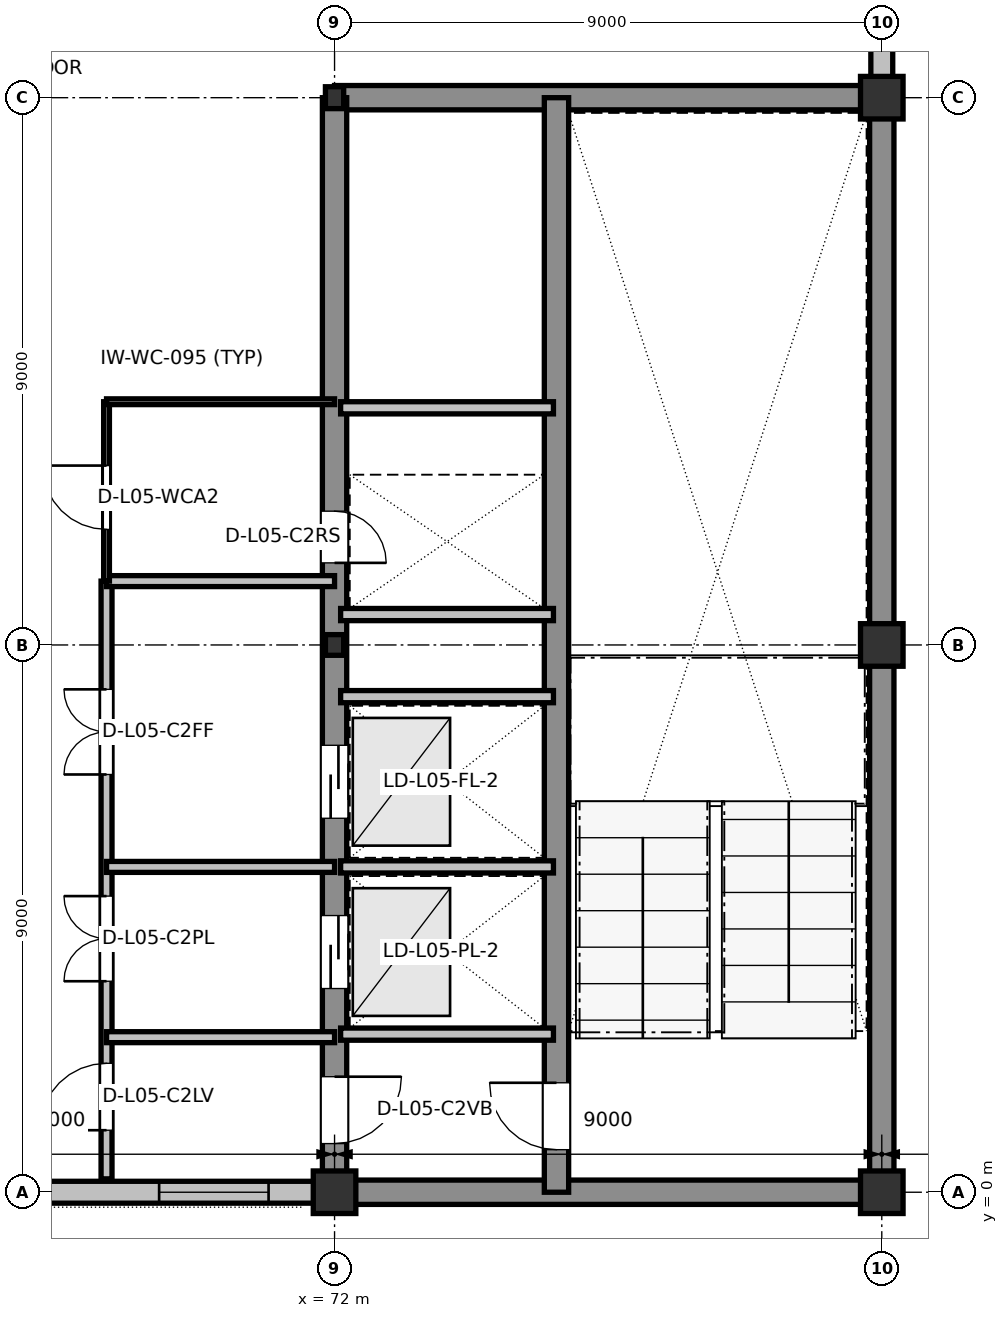
"""IFC4 building model, lengths in metres.
Left out: names, types, materials, properties, quantities, classifications, styles, units other than length and angle.
Written with IfcOpenShell. Run it as: python <this file> out.ifc"""

import sys

from ifc_helpers import new_model, si_unit, direction, frame, frame_2d, origin, origin_2d, place, context, subcontext, project, spatial, rectangle, i_section, extrude, element, fill, save


model = new_model("IFC4")
c1 = context("Model", 3, precision=1e-05, world=origin(), true_north=direction((0.0, 1.0)))
c2 = subcontext(c1, "Body", "Model", "MODEL_VIEW")
j1 = project(units=[si_unit("LENGTHUNIT", "METRE"), si_unit("PLANEANGLEUNIT", "RADIAN")], contexts=[c1])
p1 = place(None, origin())
s1 = spatial("IfcSite", under=j1, at=p1, CompositionType="ELEMENT")
p2 = place(p1, origin())
s2 = spatial("IfcBuilding", under=s1, at=p2, CompositionType="ELEMENT")
p3 = place(p2, frame((0.0, 0.0, 23.4)))
s3 = spatial("IfcBuildingStorey", under=s2, at=p3, CompositionType="ELEMENT", Elevation=23.4)
p4 = place(p3, frame((72.0, 0.0, 0.0), z_axis=(0.0, 0.0, 1.0), x_axis=(1.0, 0.0, 0.0)))
e1 = element("IfcColumn", 1, at=p4, inside=s3, PredefinedType="COLUMN", context=c2, shape_type="SweptSolid", body=[
    extrude(rectangle(XDim=0.7, YDim=0.7, at=origin_2d()), origin(), (0.0, 0.0, 1.0), 4.2),
])
p5 = place(p3, frame((72.0, 9.0, 0.0), z_axis=(0.0, 0.0, 1.0), x_axis=(1.0, 0.0, 0.0)))
e2 = element("IfcColumn", 2, at=p5, inside=s3, PredefinedType="COLUMN", context=c2, shape_type="SweptSolid", body=[
    extrude(i_section(OverallWidth=0.3, OverallDepth=0.34, WebThickness=0.012, FlangeThickness=0.021, at=origin_2d()), origin(), (0.0, 0.0, 1.0), 4.2),
])
p6 = place(p3, frame((72.0, 18.0, 0.0), z_axis=(0.0, 0.0, 1.0), x_axis=(1.0, 0.0, 0.0)))
e3 = element("IfcColumn", 3, at=p6, inside=s3, PredefinedType="COLUMN", context=c2, shape_type="SweptSolid", body=[
    extrude(i_section(OverallWidth=0.3, OverallDepth=0.36, WebThickness=0.012, FlangeThickness=0.022, at=origin_2d()), origin(), (0.0, 0.0, 1.0), 4.2),
])
for number, where, z_axis, x_axis in (
    (4, (81.0, 0.0, 0.0), (0.0, 0.0, 1.0), (1.0, 0.0, 0.0)),
    (5, (81.0, 9.0, 0.0), (0.0, 0.0, 1.0), (1.0, 0.0, 0.0)),
    (6, (81.0, 18.0, 0.0), (0.0, 0.0, 1.0), (1.0, 0.0, 0.0)),
):
    element("IfcColumn", number, at=place(p3, frame(where, z_axis=z_axis, x_axis=x_axis)), inside=s3, PredefinedType="COLUMN", context=c2, shape_type="SweptSolid", body=[
        extrude(rectangle(XDim=0.7, YDim=0.7, at=origin_2d()), origin(), (0.0, 0.0, 1.0), 4.2),
    ])
p7 = place(p3, frame((81.0, 18.335, 0.0), z_axis=(0.0, 0.0, 1.0), x_axis=(0.0, 1.0, 0.0)))
e7 = element("IfcWall", 7, at=p7, inside=s3, PredefinedType="STANDARD", context=c2, shape_type="SweptSolid", body=[
    extrude(rectangle(XDim=2.74, YDim=0.36, at=frame_2d((1.37, 0.0))), origin(), (0.0, 0.0, 1.0), 3.94),
])
p8 = place(p3, frame((63.335, 0.0, 0.0), z_axis=(0.0, 0.0, 1.0), x_axis=(1.0, 0.0, 0.0)))
e8 = element("IfcWall", 8, at=p8, inside=s3, PredefinedType="STANDARD", context=c2, shape_type="SweptSolid", body=[
    extrude(rectangle(XDim=8.33, YDim=0.36, at=frame_2d((4.165, 0.0))), origin(), (0.0, 0.0, 1.0), 3.715),
])
p9 = place(p8, frame((5.78, 0.0, 0.9)))
e9 = element("IfcOpeningElement", 9, at=p9, cuts=e8, PredefinedType="OPENING", context=c2, shape_type="SweptSolid", body=[
    extrude(rectangle(XDim=1.8, YDim=2.1, at=frame_2d((0.9, 1.05))), frame((0.0, 0.19, 0.0), z_axis=(0.0, -1.0, 0.0), x_axis=(1.0, 0.0, 0.0)), (0.0, 0.0, 1.0), 0.38),
])
p10 = place(p3, frame((72.0, 0.0, 0.0), z_axis=(0.0, 0.0, 1.0), x_axis=(1.0, 0.0, 0.0)))
e10 = element("IfcWall", 10, at=p10, inside=s3, PredefinedType="SHEAR", context=c2, shape_type="SweptSolid", body=[
    extrude(rectangle(XDim=9.0, YDim=0.4, at=frame_2d((4.5, 0.0))), origin(), (0.0, 0.0, 1.0), 3.96),
])
p11 = place(p3, frame((81.0, 0.0, 0.0), z_axis=(0.0, 0.0, 1.0), x_axis=(0.0, 1.0, 0.0)))
e11 = element("IfcWall", 11, at=p11, inside=s3, PredefinedType="SHEAR", context=c2, shape_type="SweptSolid", body=[
    extrude(rectangle(XDim=18.0, YDim=0.4, at=frame_2d((9.0, 0.0))), origin(), (0.0, 0.0, 1.0), 3.96),
])
p12 = place(p3, frame((81.0, 18.0, 0.0), z_axis=(0.0, 0.0, 1.0), x_axis=(-1.0, 0.0, 0.0)))
e12 = element("IfcWall", 12, at=p12, inside=s3, PredefinedType="SHEAR", context=c2, shape_type="SweptSolid", body=[
    extrude(rectangle(XDim=9.0, YDim=0.4, at=frame_2d((4.5, 0.0))), origin(), (0.0, 0.0, 1.0), 3.96),
])
p13 = place(p3, frame((72.0, 18.0, 0.0), z_axis=(0.0, 0.0, 1.0), x_axis=(0.0, -1.0, 0.0)))
e13 = element("IfcWall", 13, at=p13, inside=s3, PredefinedType="SHEAR", context=c2, shape_type="SweptSolid", body=[
    extrude(rectangle(XDim=18.0, YDim=0.4, at=frame_2d((9.0, 0.0))), origin(), (0.0, 0.0, 1.0), 3.96),
])
p14 = place(p13, frame((16.1, 0.0, 0.0)))
e14 = element("IfcOpeningElement", 14, at=p14, cuts=e13, PredefinedType="OPENING", context=c2, shape_type="SweptSolid", body=[
    extrude(rectangle(XDim=1.1, YDim=2.16, at=frame_2d((0.55, 1.08))), frame((0.0, 0.21, 0.0), z_axis=(0.0, -1.0, 0.0), x_axis=(1.0, 0.0, 0.0)), (0.0, 0.0, 1.0), 0.42),
])
p15 = place(p13, frame((13.45, 0.0, 0.0)))
e15 = element("IfcOpeningElement", 15, at=p15, cuts=e13, PredefinedType="OPENING", context=c2, shape_type="SweptSolid", body=[
    extrude(rectangle(XDim=1.2, YDim=2.2, at=frame_2d((0.6, 1.1))), frame((0.0, 0.21, 0.0), z_axis=(0.0, -1.0, 0.0), x_axis=(1.0, 0.0, 0.0)), (0.0, 0.0, 1.0), 0.42),
])
p16 = place(p13, frame((10.65, 0.0, 0.0)))
e16 = element("IfcOpeningElement", 16, at=p16, cuts=e13, PredefinedType="OPENING", context=c2, shape_type="SweptSolid", body=[
    extrude(rectangle(XDim=1.2, YDim=2.2, at=frame_2d((0.6, 1.1))), frame((0.0, 0.21, 0.0), z_axis=(0.0, -1.0, 0.0), x_axis=(1.0, 0.0, 0.0)), (0.0, 0.0, 1.0), 0.42),
])
p17 = place(p13, frame((6.8, 0.0, 0.0)))
e17 = element("IfcOpeningElement", 17, at=p17, cuts=e13, PredefinedType="OPENING", context=c2, shape_type="SweptSolid", body=[
    extrude(rectangle(XDim=0.85, YDim=2.1, at=frame_2d((0.425, 1.05))), frame((0.0, 0.21, 0.0), z_axis=(0.0, -1.0, 0.0), x_axis=(1.0, 0.0, 0.0)), (0.0, 0.0, 1.0), 0.42),
])
p18 = place(p3, frame((75.65, 0.0, 0.0), z_axis=(0.0, 0.0, 1.0), x_axis=(0.0, 1.0, 0.0)))
e18 = element("IfcWall", 18, at=p18, inside=s3, PredefinedType="SHEAR", context=c2, shape_type="SweptSolid", body=[
    extrude(rectangle(XDim=18.0, YDim=0.4, at=frame_2d((9.0, 0.0))), origin(), (0.0, 0.0, 1.0), 3.96),
])
p19 = place(p18, frame((0.7, 0.0, 0.0)))
e19 = element("IfcOpeningElement", 19, at=p19, cuts=e18, PredefinedType="OPENING", context=c2, shape_type="SweptSolid", body=[
    extrude(rectangle(XDim=1.1, YDim=2.16, at=frame_2d((0.55, 1.08))), frame((0.0, 0.21, 0.0), z_axis=(0.0, -1.0, 0.0), x_axis=(1.0, 0.0, 0.0)), (0.0, 0.0, 1.0), 0.42),
])
for number, where, z_axis, x_axis in (
    (20, (72.1, 2.6, 0.0), (0.0, 0.0, 1.0), (1.0, 0.0, 0.0)),
    (21, (72.1, 5.35, 0.0), (0.0, 0.0, 1.0), (1.0, 0.0, 0.0)),
    (22, (72.1, 8.15, 0.0), (0.0, 0.0, 1.0), (1.0, 0.0, 0.0)),
    (23, (72.1, 9.5, 0.0), (0.0, 0.0, 1.0), (1.0, 0.0, 0.0)),
    (24, (72.1, 12.9, 0.0), (0.0, 0.0, 1.0), (1.0, 0.0, 0.0)),
):
    element("IfcWall", number, at=place(p3, frame(where, z_axis=z_axis, x_axis=x_axis)), inside=s3, PredefinedType="PARTITIONING", context=c2, shape_type="SweptSolid", body=[
        extrude(rectangle(XDim=3.5, YDim=0.2, at=frame_2d((1.75, 0.0))), origin(), (0.0, 0.0, 1.0), 3.96),
    ])
p20 = place(p3, frame((68.25, 0.22, 0.0), z_axis=(0.0, 0.0, 1.0), x_axis=(0.0, 1.0, 0.0)))
e25 = element("IfcWall", 25, at=p20, inside=s3, PredefinedType="PARTITIONING", context=c2, shape_type="SweptSolid", body=[
    extrude(rectangle(XDim=9.83, YDim=0.18, at=frame_2d((4.915, 0.0))), origin(), (0.0, 0.0, 1.0), 3.96),
])
p21 = place(p20, frame((0.8, 0.0, 0.0)))
e26 = element("IfcOpeningElement", 26, at=p21, cuts=e25, PredefinedType="OPENING", context=c2, shape_type="SweptSolid", body=[
    extrude(rectangle(XDim=1.1, YDim=2.16, at=frame_2d((0.55, 1.08))), frame((0.0, 0.1, 0.0), z_axis=(0.0, -1.0, 0.0), x_axis=(1.0, 0.0, 0.0)), (0.0, 0.0, 1.0), 0.2),
])
p22 = place(p20, frame((3.25, 0.0, 0.0)))
e27 = element("IfcOpeningElement", 27, at=p22, cuts=e25, PredefinedType="OPENING", context=c2, shape_type="SweptSolid", body=[
    extrude(rectangle(XDim=1.4, YDim=2.2, at=frame_2d((0.7, 1.1))), frame((0.0, 0.1, 0.0), z_axis=(0.0, -1.0, 0.0), x_axis=(1.0, 0.0, 0.0)), (0.0, 0.0, 1.0), 0.2),
])
p23 = place(p20, frame((6.65, 0.0, 0.0)))
e28 = element("IfcOpeningElement", 28, at=p23, cuts=e25, PredefinedType="OPENING", context=c2, shape_type="SweptSolid", body=[
    extrude(rectangle(XDim=1.4, YDim=2.2, at=frame_2d((0.7, 1.1))), frame((0.0, 0.1, 0.0), z_axis=(0.0, -1.0, 0.0), x_axis=(1.0, 0.0, 0.0)), (0.0, 0.0, 1.0), 0.2),
])
for number, where, z_axis, x_axis in (
    (29, (68.25, 2.55, 0.0), (0.0, 0.0, 1.0), (1.0, 0.0, 0.0)),
    (30, (68.25, 5.35, 0.0), (0.0, 0.0, 1.0), (1.0, 0.0, 0.0)),
    (31, (68.25, 10.05, 0.0), (0.0, 0.0, 1.0), (1.0, 0.0, 0.0)),
):
    element("IfcWall", number, at=place(p3, frame(where, z_axis=z_axis, x_axis=x_axis)), inside=s3, PredefinedType="PARTITIONING", context=c2, shape_type="SweptSolid", body=[
        extrude(rectangle(XDim=3.75, YDim=0.18, at=frame_2d((1.875, 0.0))), origin(), (0.0, 0.0, 1.0), 3.96),
    ])
p24 = place(p3, frame((68.25, 10.05, 0.0), z_axis=(0.0, 0.0, 1.0), x_axis=(0.0, 1.0, 0.0)))
e32 = element("IfcWall", 32, at=p24, inside=s3, PredefinedType="PARTITIONING", context=c2, shape_type="SweptSolid", body=[
    extrude(rectangle(XDim=2.95, YDim=0.095, at=frame_2d((1.475, 0.0))), origin(), (0.0, 0.0, 1.0), 3.96),
])
p25 = place(p24, frame((0.85, 0.0, 0.0)))
e33 = element("IfcOpeningElement", 33, at=p25, cuts=e32, PredefinedType="OPENING", context=c2, shape_type="SweptSolid", body=[
    extrude(rectangle(XDim=1.05, YDim=2.13, at=frame_2d((0.525, 1.065))), frame((0.0, 0.057, 0.0), z_axis=(0.0, -1.0, 0.0), x_axis=(1.0, 0.0, 0.0)), (0.0, 0.0, 1.0), 0.115),
])
p26 = place(p3, frame((68.25, 13.0, 0.0), z_axis=(0.0, 0.0, 1.0), x_axis=(1.0, 0.0, 0.0)))
e34 = element("IfcWall", 34, at=p26, inside=s3, PredefinedType="PARTITIONING", context=c2, shape_type="SweptSolid", body=[
    extrude(rectangle(XDim=3.75, YDim=0.095, at=frame_2d((1.875, 0.0))), origin(), (0.0, 0.0, 1.0), 3.96),
])
p27 = place(p9, origin())
e35 = element("IfcWindow", 35, at=p27, inside=s3, PartitioningType="SINGLE_PANEL", PredefinedType="WINDOW", context=c2, shape_type="SweptSolid", body=[
    extrude(rectangle(XDim=1.8, YDim=2.1, at=frame_2d((0.9, 1.05))), frame((0.0, 0.03, 0.0), z_axis=(0.0, -1.0, 0.0), x_axis=(1.0, 0.0, 0.0)), (0.0, 0.0, 1.0), 0.06),
])
fill(e9, e35)
p28 = place(p19, origin())
e36 = element("IfcDoor", 36, at=p28, inside=s3, OperationType="SINGLE_SWING_RIGHT", PredefinedType="DOOR", context=c2, shape_type="SweptSolid", body=[
    extrude(rectangle(XDim=1.1, YDim=2.16, at=frame_2d((0.55, 1.08))), frame((0.0, 0.025, 0.0), z_axis=(0.0, -1.0, 0.0), x_axis=(1.0, 0.0, 0.0)), (0.0, 0.0, 1.0), 0.05),
])
fill(e19, e36)
p29 = place(p14, origin())
e37 = element("IfcDoor", 37, at=p29, inside=s3, OperationType="SINGLE_SWING_LEFT", PredefinedType="DOOR", context=c2, shape_type="SweptSolid", body=[
    extrude(rectangle(XDim=1.1, YDim=2.16, at=frame_2d((0.55, 1.08))), frame((0.0, 0.025, 0.0), z_axis=(0.0, -1.0, 0.0), x_axis=(1.0, 0.0, 0.0)), (0.0, 0.0, 1.0), 0.05),
])
fill(e14, e37)
p30 = place(p15, origin())
e38 = element("IfcDoor", 38, at=p30, inside=s3, OperationType="SLIDING_TO_LEFT", PredefinedType="DOOR", context=c2, shape_type="SweptSolid", body=[
    extrude(rectangle(XDim=1.2, YDim=2.2, at=frame_2d((0.6, 1.1))), frame((0.0, 0.025, 0.0), z_axis=(0.0, -1.0, 0.0), x_axis=(1.0, 0.0, 0.0)), (0.0, 0.0, 1.0), 0.05),
])
fill(e15, e38)
p31 = place(p16, origin())
e39 = element("IfcDoor", 39, at=p31, inside=s3, OperationType="SLIDING_TO_LEFT", PredefinedType="DOOR", context=c2, shape_type="SweptSolid", body=[
    extrude(rectangle(XDim=1.2, YDim=2.2, at=frame_2d((0.6, 1.1))), frame((0.0, 0.025, 0.0), z_axis=(0.0, -1.0, 0.0), x_axis=(1.0, 0.0, 0.0)), (0.0, 0.0, 1.0), 0.05),
])
fill(e16, e39)
p32 = place(p17, origin())
e40 = element("IfcDoor", 40, at=p32, inside=s3, OperationType="SINGLE_SWING_RIGHT", PredefinedType="DOOR", context=c2, shape_type="SweptSolid", body=[
    extrude(rectangle(XDim=0.85, YDim=2.1, at=frame_2d((0.425, 1.05))), frame((0.0, 0.025, 0.0), z_axis=(0.0, -1.0, 0.0), x_axis=(1.0, 0.0, 0.0)), (0.0, 0.0, 1.0), 0.05),
])
fill(e17, e40)
p33 = place(p21, origin())
e41 = element("IfcDoor", 41, at=p33, inside=s3, OperationType="SINGLE_SWING_LEFT", PredefinedType="DOOR", context=c2, shape_type="SweptSolid", body=[
    extrude(rectangle(XDim=1.1, YDim=2.16, at=frame_2d((0.55, 1.08))), frame((0.0, 0.025, 0.0), z_axis=(0.0, -1.0, 0.0), x_axis=(1.0, 0.0, 0.0)), (0.0, 0.0, 1.0), 0.05),
])
fill(e26, e41)
p34 = place(p22, origin())
e42 = element("IfcDoor", 42, at=p34, inside=s3, OperationType="DOUBLE_DOOR_SINGLE_SWING", PredefinedType="DOOR", context=c2, shape_type="SweptSolid", body=[
    extrude(rectangle(XDim=1.4, YDim=2.2, at=frame_2d((0.7, 1.1))), frame((0.0, 0.025, 0.0), z_axis=(0.0, -1.0, 0.0), x_axis=(1.0, 0.0, 0.0)), (0.0, 0.0, 1.0), 0.05),
])
fill(e27, e42)
p35 = place(p23, origin())
e43 = element("IfcDoor", 43, at=p35, inside=s3, OperationType="DOUBLE_DOOR_SINGLE_SWING", PredefinedType="DOOR", context=c2, shape_type="SweptSolid", body=[
    extrude(rectangle(XDim=1.4, YDim=2.2, at=frame_2d((0.7, 1.1))), frame((0.0, 0.025, 0.0), z_axis=(0.0, -1.0, 0.0), x_axis=(1.0, 0.0, 0.0)), (0.0, 0.0, 1.0), 0.05),
])
fill(e28, e43)
p36 = place(p25, origin())
e44 = element("IfcDoor", 44, at=p36, inside=s3, OperationType="SINGLE_SWING_RIGHT", PredefinedType="DOOR", context=c2, shape_type="SweptSolid", body=[
    extrude(rectangle(XDim=1.05, YDim=2.13, at=frame_2d((0.525, 1.065))), frame((0.0, 0.025, 0.0), z_axis=(0.0, -1.0, 0.0), x_axis=(1.0, 0.0, 0.0)), (0.0, 0.0, 1.0), 0.05),
])
fill(e33, e44)
save(model, sys.argv[1])
